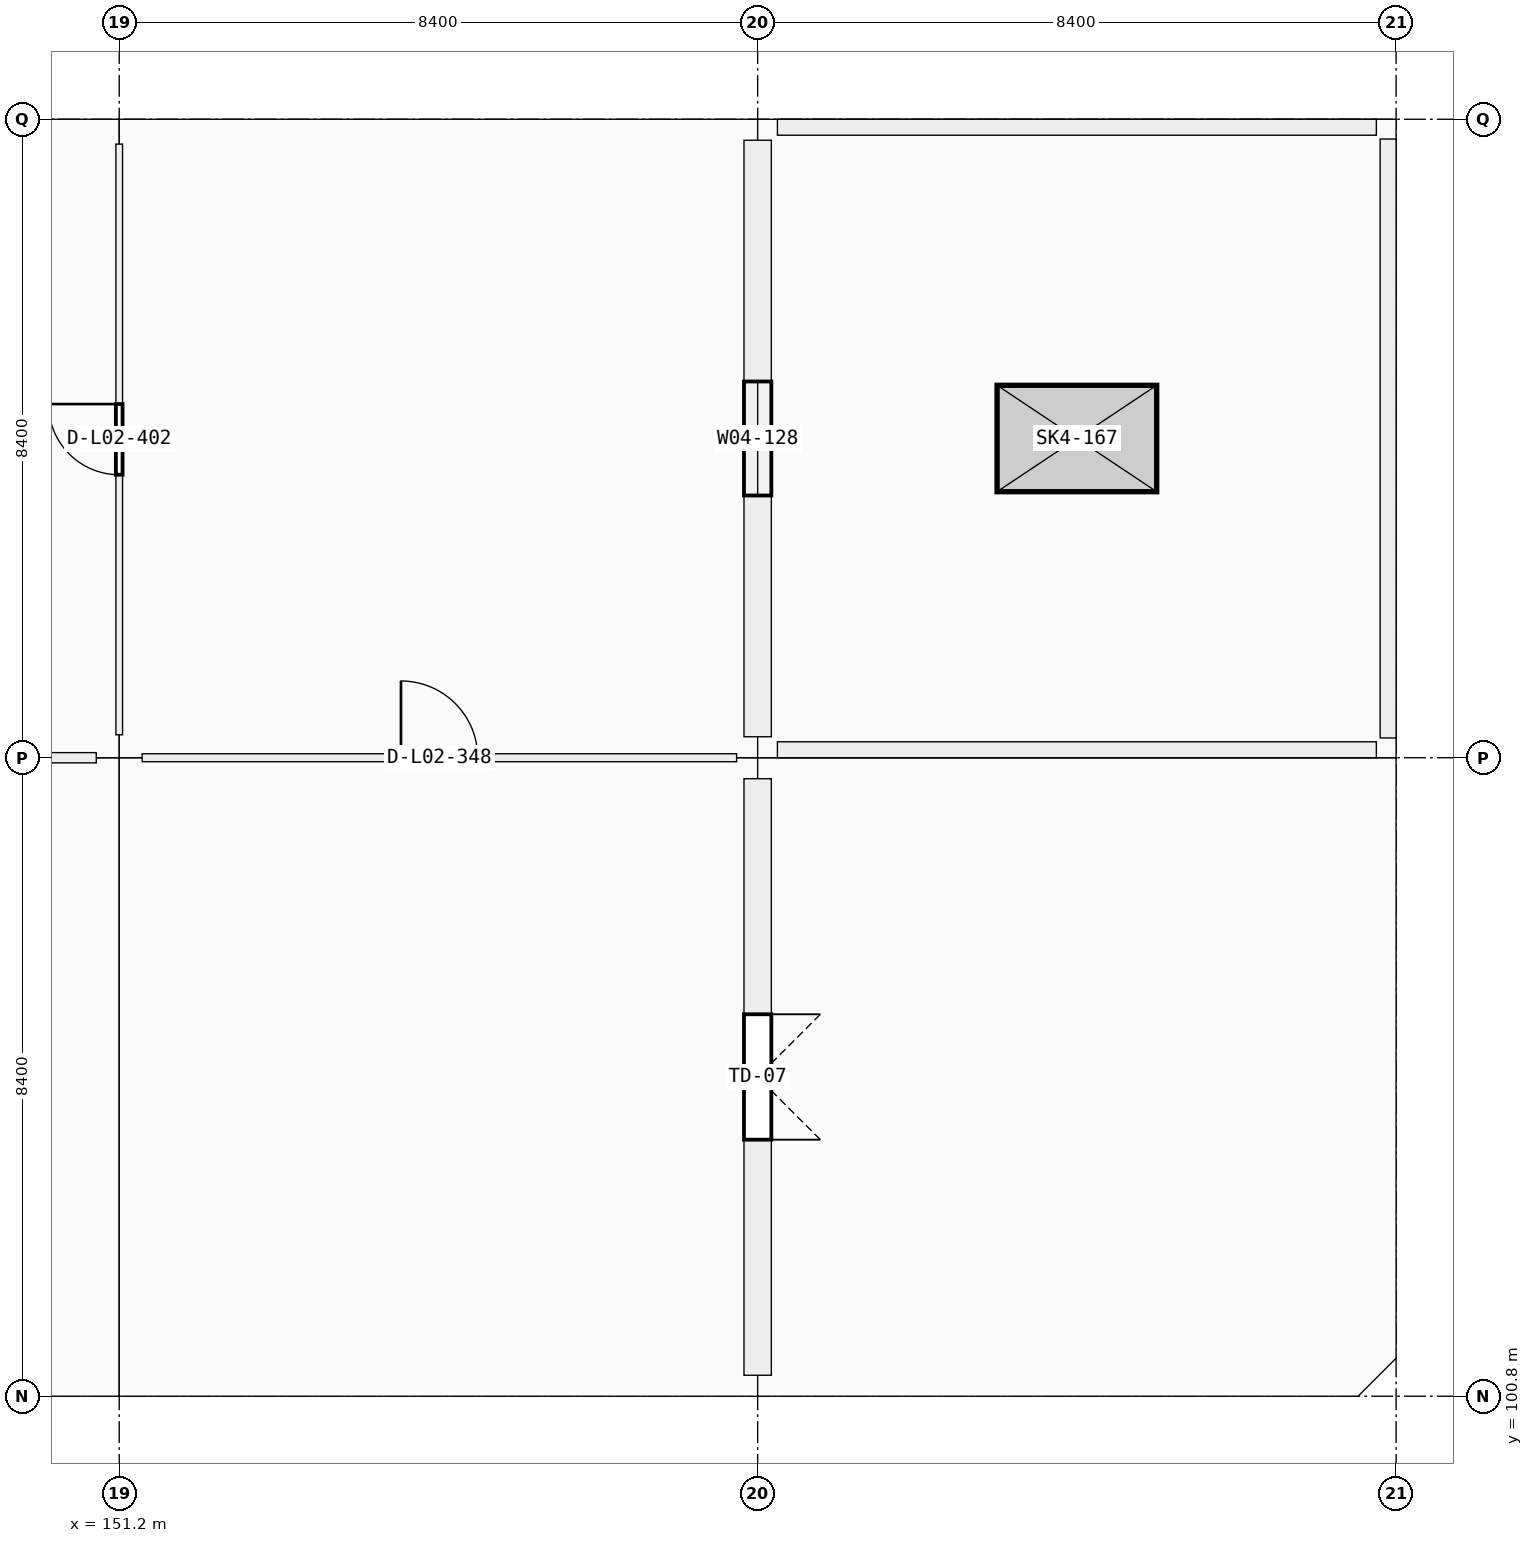
"""IFC4 building model, lengths in metres.
Left out: names, types, materials, properties, quantities, classifications, styles, units other than length and angle.
Written with IfcOpenShell. Run it as: python <this file> out.ifc"""

import sys

from ifc_helpers import new_model, si_unit, direction, frame, frame_2d, origin, origin_2d, place, context, subcontext, project, spatial, rectangle, extrude, element, fill, save


model = new_model("IFC4")
c1 = context("Model", 3, precision=1e-05, world=origin(), true_north=direction((0.0, 1.0)))
c2 = subcontext(c1, "Body", "Model", "MODEL_VIEW")
j1 = project(units=[si_unit("LENGTHUNIT", "METRE"), si_unit("PLANEANGLEUNIT", "RADIAN")], contexts=[c1])
p1 = place(None, origin())
s1 = spatial("IfcSite", under=j1, at=p1, CompositionType="ELEMENT")
p2 = place(p1, origin())
s2 = spatial("IfcBuilding", under=s1, at=p2, CompositionType="ELEMENT")
p3 = place(p2, frame((0.0, 0.0, 10.26)))
s3 = spatial("IfcBuildingStorey", under=s2, at=p3, CompositionType="ELEMENT", Elevation=10.26)
p4 = place(p3, frame((151.2, 100.8, 0.0), z_axis=(0.0, 0.0, 1.0), x_axis=(1.0, 0.0, 0.0)))
e1 = element("IfcColumn", 1, at=p4, inside=s3, PredefinedType="COLUMN", context=c2, shape_type="SweptSolid", body=[
    extrude(rectangle(XDim=0.65, YDim=0.65, at=origin_2d()), origin(), (0.0, 0.0, 1.0), 4.5),
])
p5 = place(p3, frame((151.2, 109.2, 0.0), z_axis=(0.0, 0.0, 1.0), x_axis=(1.0, 0.0, 0.0)))
e2 = element("IfcColumn", 2, at=p5, inside=s3, PredefinedType="COLUMN", context=c2, shape_type="SweptSolid", body=[
    extrude(rectangle(XDim=0.6, YDim=0.6, at=origin_2d()), origin(), (0.0, 0.0, 1.0), 4.5),
])
p6 = place(p3, frame((151.2, 117.6, 0.0), z_axis=(0.0, 0.0, 1.0), x_axis=(1.0, 0.0, 0.0)))
e3 = element("IfcColumn", 3, at=p6, inside=s3, PredefinedType="COLUMN", context=c2, shape_type="SweptSolid", body=[
    extrude(rectangle(XDim=0.65, YDim=0.65, at=origin_2d()), origin(), (0.0, 0.0, 1.0), 4.5),
])
for number, where, z_axis, x_axis in (
    (4, (159.6, 100.8, 0.0), (0.0, 0.0, 1.0), (1.0, 0.0, 0.0)),
    (5, (159.6, 109.2, 0.0), (0.0, 0.0, 1.0), (1.0, 0.0, 0.0)),
    (6, (159.6, 117.6, 0.0), (0.0, 0.0, 1.0), (1.0, 0.0, 0.0)),
):
    element("IfcColumn", number, at=place(p3, frame(where, z_axis=z_axis, x_axis=x_axis)), inside=s3, PredefinedType="COLUMN", context=c2, shape_type="SweptSolid", body=[
        extrude(rectangle(XDim=0.55, YDim=0.55, at=origin_2d()), origin(), (0.0, 0.0, 1.0), 4.25),
    ])
p7 = place(p3, frame((159.6, 108.924, 0.0), z_axis=(0.0, 0.0, 1.0), x_axis=(0.0, -1.0, 0.0)))
e7 = element("IfcWall", 7, at=p7, inside=s3, PredefinedType="SOLIDWALL", context=c2, shape_type="SweptSolid", body=[
    extrude(rectangle(XDim=7.848, YDim=0.36, at=frame_2d((3.924, 0.0))), origin(), (0.0, 0.0, 1.0), 3.54),
])
p8 = place(p7, frame((3.099, 0.0, 0.0)))
e8 = element("IfcOpeningElement", 8, at=p8, cuts=e7, PredefinedType="OPENING", context=c2, shape_type="SweptSolid", body=[
    extrude(rectangle(XDim=1.65, YDim=2.2, at=frame_2d((0.825, 1.1))), frame((0.0, 0.18, 0.0), z_axis=(0.0, -1.0, 0.0), x_axis=(1.0, 0.0, 0.0)), (0.0, 0.0, 1.0), 0.36),
])
p9 = place(p3, frame((159.6, 117.324, 0.0), z_axis=(0.0, 0.0, 1.0), x_axis=(0.0, -1.0, 0.0)))
e9 = element("IfcWall", 9, at=p9, inside=s3, PredefinedType="SOLIDWALL", context=c2, shape_type="SweptSolid", body=[
    extrude(rectangle(XDim=7.848, YDim=0.36, at=frame_2d((3.924, 0.0))), origin(), (0.0, 0.0, 1.0), 3.54),
])
p10 = place(p9, frame((3.174, 0.0, 0.9)))
e10 = element("IfcOpeningElement", 10, at=p10, cuts=e9, PredefinedType="OPENING", context=c2, shape_type="SweptSolid", body=[
    extrude(rectangle(XDim=1.5, YDim=1.8, at=frame_2d((0.75, 0.9))), frame((0.0, 0.18, 0.0), z_axis=(0.0, -1.0, 0.0), x_axis=(1.0, 0.0, 0.0)), (0.0, 0.0, 1.0), 0.36),
])
for number, where, z_axis, x_axis in (
    (11, (167.74, 109.305, 0.0), (0.0, 0.0, 1.0), (-1.0, 0.0, 0.0)),
    (12, (159.86, 117.495, 0.0), (0.0, 0.0, 1.0), (1.0, 0.0, 0.0)),
):
    element("IfcWall", number, at=place(p3, frame(where, z_axis=z_axis, x_axis=x_axis)), inside=s3, PredefinedType="PARAPET", context=c2, shape_type="SweptSolid", body=[
        extrude(rectangle(XDim=7.88, YDim=0.21, at=frame_2d((3.94, 0.0))), origin(), (0.0, 0.0, 1.0), 0.95),
    ])
p11 = place(p3, frame((167.895, 117.34, 0.0), z_axis=(0.0, 0.0, 1.0), x_axis=(0.0, -1.0, 0.0)))
e13 = element("IfcWall", 13, at=p11, inside=s3, PredefinedType="PARAPET", context=c2, shape_type="SweptSolid", body=[
    extrude(rectangle(XDim=7.88, YDim=0.21, at=frame_2d((3.94, 0.0))), origin(), (0.0, 0.0, 1.0), 0.95),
])
p12 = place(p3, frame((143.127, 109.2, 0.0), z_axis=(0.0, 0.0, 1.0), x_axis=(1.0, 0.0, 0.0)))
e14 = element("IfcWall", 14, at=p12, inside=s3, PredefinedType="PARTITIONING", context=c2, shape_type="SweptSolid", body=[
    extrude(rectangle(XDim=7.771, YDim=0.135, at=frame_2d((3.885, 0.0))), origin(), (0.0, 0.0, 1.0), 3.37),
])
p13 = place(p12, frame((3.361, 0.0, 0.0)))
e15 = element("IfcOpeningElement", 15, at=p13, cuts=e14, PredefinedType="OPENING", context=c2, shape_type="SweptSolid", body=[
    extrude(rectangle(XDim=1.05, YDim=2.12, at=frame_2d((0.525, 1.06))), frame((0.0, 0.067, 0.0), z_axis=(0.0, -1.0, 0.0), x_axis=(1.0, 0.0, 0.0)), (0.0, 0.0, 1.0), 0.135),
])
p14 = place(p3, frame((151.502, 109.2, 0.0), z_axis=(0.0, 0.0, 1.0), x_axis=(1.0, 0.0, 0.0)))
e16 = element("IfcWall", 16, at=p14, inside=s3, PredefinedType="PARTITIONING", context=c2, shape_type="SweptSolid", body=[
    extrude(rectangle(XDim=7.821, YDim=0.105, at=frame_2d((3.911, 0.0))), origin(), (0.0, 0.0, 1.0), 3.37),
])
p15 = place(p14, frame((3.405, 0.0, 0.0)))
e17 = element("IfcOpeningElement", 17, at=p15, cuts=e16, PredefinedType="OPENING", context=c2, shape_type="SweptSolid", body=[
    extrude(rectangle(XDim=1.01, YDim=2.12, at=frame_2d((0.505, 1.06))), frame((0.0, 0.052, 0.0), z_axis=(0.0, -1.0, 0.0), x_axis=(1.0, 0.0, 0.0)), (0.0, 0.0, 1.0), 0.105),
])
p16 = place(p3, frame((151.2, 109.502, 0.0), z_axis=(0.0, 0.0, 1.0), x_axis=(0.0, 1.0, 0.0)))
e18 = element("IfcWall", 18, at=p16, inside=s3, PredefinedType="PARTITIONING", context=c2, shape_type="SweptSolid", body=[
    extrude(rectangle(XDim=7.771, YDim=0.088, at=frame_2d((3.885, 0.0))), origin(), (0.0, 0.0, 1.0), 3.37),
])
p17 = place(p16, frame((3.421, 0.0, 0.0)))
e19 = element("IfcOpeningElement", 19, at=p17, cuts=e18, PredefinedType="OPENING", context=c2, shape_type="SweptSolid", body=[
    extrude(rectangle(XDim=0.93, YDim=2.12, at=frame_2d((0.465, 1.06))), frame((0.0, 0.044, 0.0), z_axis=(0.0, -1.0, 0.0), x_axis=(1.0, 0.0, 0.0)), (0.0, 0.0, 1.0), 0.088),
])
p18 = place(p8, origin())
e20 = element("IfcDoor", 20, at=p18, inside=s3, OperationType="DOUBLE_DOOR_SINGLE_SWING", PredefinedType="DOOR", context=c2, shape_type="SweptSolid", body=[
    extrude(rectangle(XDim=1.65, YDim=2.2, at=frame_2d((0.825, 1.1))), frame((0.0, 0.025, 0.0), z_axis=(0.0, -1.0, 0.0), x_axis=(1.0, 0.0, 0.0)), (0.0, 0.0, 1.0), 0.05),
])
fill(e8, e20)
p19 = place(p10, origin())
e21 = element("IfcWindow", 21, at=p19, inside=s3, PartitioningType="SINGLE_PANEL", PredefinedType="WINDOW", context=c2, shape_type="SweptSolid", body=[
    extrude(rectangle(XDim=1.5, YDim=1.8, at=frame_2d((0.75, 0.9))), frame((0.0, 0.03, 0.0), z_axis=(0.0, -1.0, 0.0), x_axis=(1.0, 0.0, 0.0)), (0.0, 0.0, 1.0), 0.06),
])
fill(e10, e21)
p20 = place(p3, frame((0.0, 0.0, -0.3)))
p21 = place(p20, frame((163.8, 113.4, 0.0)))
p22 = place(p21, frame((0.0, 0.0, 0.25)))
e22 = element("IfcWindow", 22, at=p22, inside=s3, PartitioningType="SINGLE_PANEL", PredefinedType="SKYLIGHT", context=c2, shape_type="SweptSolid", body=[
    extrude(rectangle(XDim=2.1, YDim=1.4, at=origin_2d()), origin(), (0.0, 0.0, 1.0), 0.05),
])
p23 = place(p15, origin())
e23 = element("IfcDoor", 23, at=p23, inside=s3, OperationType="SINGLE_SWING_LEFT", PredefinedType="DOOR", context=c2, shape_type="SweptSolid", body=[
    extrude(rectangle(XDim=1.01, YDim=2.12, at=frame_2d((0.505, 1.06))), frame((0.0, 0.025, 0.0), z_axis=(0.0, -1.0, 0.0), x_axis=(1.0, 0.0, 0.0)), (0.0, 0.0, 1.0), 0.05),
])
fill(e17, e23)
p24 = place(p17, origin())
e24 = element("IfcDoor", 24, at=p24, inside=s3, OperationType="SINGLE_SWING_RIGHT", PredefinedType="DOOR", context=c2, shape_type="SweptSolid", body=[
    extrude(rectangle(XDim=0.93, YDim=2.12, at=frame_2d((0.465, 1.06))), frame((0.0, 0.025, 0.0), z_axis=(0.0, -1.0, 0.0), x_axis=(1.0, 0.0, 0.0)), (0.0, 0.0, 1.0), 0.05),
])
fill(e19, e24)
save(model, sys.argv[1])
